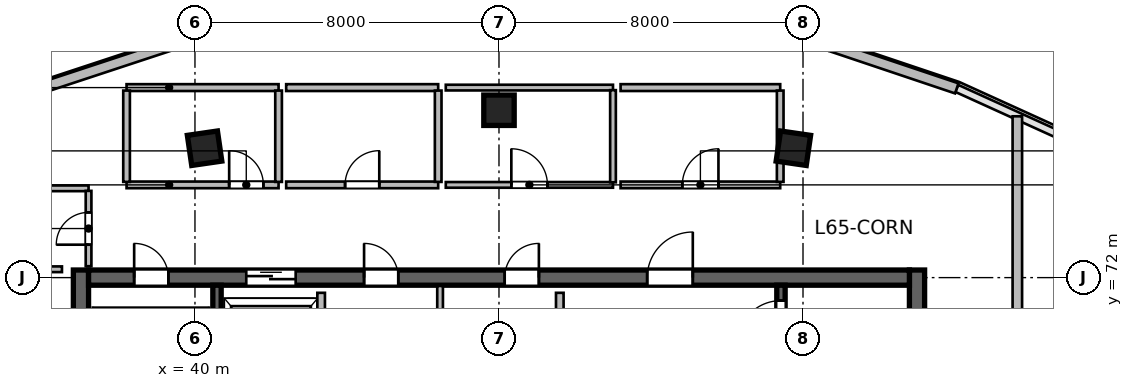
"""IFC4 building model, lengths in metres.
Left out: names, types, materials, properties, quantities, classifications, styles, units other than length and angle.
Written with IfcOpenShell. Run it as: python <this file> out.ifc"""

import sys

from ifc_helpers import new_model, si_unit, direction, frame, frame_2d, origin, origin_2d, place, context, subcontext, project, spatial, rectangle, extrude, source, transform, mapped, element, fill, save


model = new_model("IFC4")
c1 = context("Model", 3, precision=1e-05, world=origin(), true_north=direction((0.0, 1.0)))
c2 = subcontext(c1, "Body", "Model", "MODEL_VIEW")
j1 = project(units=[si_unit("LENGTHUNIT", "METRE"), si_unit("PLANEANGLEUNIT", "RADIAN")], contexts=[c1])
p1 = place(None, origin())
s1 = spatial("IfcSite", under=j1, at=p1, CompositionType="ELEMENT")
p2 = place(p1, origin())
s2 = spatial("IfcBuilding", under=s1, at=p2, CompositionType="ELEMENT")
p3 = place(p2, frame((0.0, 0.0, 267.9)))
s3 = spatial("IfcBuildingStorey", under=s2, at=p3, CompositionType="ELEMENT", Elevation=267.9)
m1 = source(origin(), c2, "Body", "SweptSolid", [
    extrude(rectangle(XDim=12.0, YDim=0.4, at=frame_2d((6.0, 0.0))), origin(), (0.0, 0.0, 1.0), 3.9),
])
for number, where, z_axis, x_axis in (
    (1, (37.0, 60.2, 0.0), (0.0, 0.0, 1.0), (0.0, 1.0, 0.0)),
    (2, (59.0, 60.2, 0.0), (0.0, 0.0, 1.0), (0.0, 1.0, 0.0)),
):
    element("IfcWall", number, at=place(p3, frame(where, z_axis=z_axis, x_axis=x_axis)), inside=s3, PredefinedType="SHEAR", context=c2, shape_type="MappedRepresentation", body=[
        mapped(m1, transform((0.0, 0.0, 0.0), scale=1.0)),
    ])
m2 = source(origin(), c2, "Body", "SweptSolid", [
    extrude(rectangle(XDim=21.6, YDim=0.4, at=frame_2d((10.8, 0.0))), origin(), (0.0, 0.0, 1.0), 3.9),
])
p4 = place(p3, frame((37.2, 72.0, 0.0), z_axis=(0.0, 0.0, 1.0), x_axis=(1.0, 0.0, 0.0)))
e3 = element("IfcWall", 3, at=p4, inside=s3, PredefinedType="SHEAR", context=c2, shape_type="MappedRepresentation", body=[
    mapped(m2, transform((0.0, 0.0, 0.0), scale=1.0)),
])
p5 = place(p4, frame((1.2, 0.0, 0.0)))
e4 = element("IfcOpeningElement", 4, at=p5, cuts=e3, PredefinedType="OPENING", context=c2, shape_type="SweptSolid", body=[
    extrude(rectangle(XDim=0.9, YDim=2.1, at=frame_2d((0.45, 1.05))), frame((0.0, 0.21, 0.0), z_axis=(0.0, -1.0, 0.0), x_axis=(1.0, 0.0, 0.0)), (0.0, 0.0, 1.0), 0.42),
])
p6 = place(p4, frame((14.7, 0.0, 0.0)))
e5 = element("IfcOpeningElement", 5, at=p6, cuts=e3, PredefinedType="OPENING", context=c2, shape_type="SweptSolid", body=[
    extrude(rectangle(XDim=1.2, YDim=2.15, at=frame_2d((0.6, 1.075))), frame((0.0, 0.21, 0.0), z_axis=(0.0, -1.0, 0.0), x_axis=(1.0, 0.0, 0.0)), (0.0, 0.0, 1.0), 0.42),
])
p7 = place(p4, frame((4.15, 0.0, 0.0)))
e6 = element("IfcOpeningElement", 6, at=p7, cuts=e3, PredefinedType="OPENING", context=c2, shape_type="SweptSolid", body=[
    extrude(rectangle(XDim=1.3, YDim=2.15, at=frame_2d((0.65, 1.075))), frame((0.0, 0.21, 0.0), z_axis=(0.0, -1.0, 0.0), x_axis=(1.0, 0.0, 0.0)), (0.0, 0.0, 1.0), 0.42),
])
p8 = place(p4, frame((7.25, 0.0, 0.0)))
e7 = element("IfcOpeningElement", 7, at=p8, cuts=e3, PredefinedType="OPENING", context=c2, shape_type="SweptSolid", body=[
    extrude(rectangle(XDim=0.9, YDim=2.1, at=frame_2d((0.45, 1.05))), frame((0.0, 0.21, 0.0), z_axis=(0.0, -1.0, 0.0), x_axis=(1.0, 0.0, 0.0)), (0.0, 0.0, 1.0), 0.42),
])
p9 = place(p4, frame((10.95, 0.0, 0.0)))
e8 = element("IfcOpeningElement", 8, at=p9, cuts=e3, PredefinedType="OPENING", context=c2, shape_type="SweptSolid", body=[
    extrude(rectangle(XDim=0.9, YDim=2.1, at=frame_2d((0.45, 1.05))), frame((0.0, 0.21, 0.0), z_axis=(0.0, -1.0, 0.0), x_axis=(1.0, 0.0, 0.0)), (0.0, 0.0, 1.0), 0.42),
])
m3 = source(origin(), c2, "Body", "SweptSolid", [
    extrude(rectangle(XDim=11.2, YDim=0.22, at=frame_2d((5.6, 0.0))), origin(), (0.0, 0.0, 1.0), 3.9),
])
p10 = place(p3, frame((40.58, 60.6, 0.0), z_axis=(0.0, 0.0, 1.0), x_axis=(0.0, 1.0, 0.0)))
e9 = element("IfcWall", 9, at=p10, inside=s3, PredefinedType="SHEAR", context=c2, shape_type="MappedRepresentation", body=[
    mapped(m3, transform((0.0, 0.0, 0.0), scale=1.0)),
])
p11 = place(p3, frame((55.42, 60.6, 0.0), z_axis=(0.0, 0.0, 1.0), x_axis=(0.0, 1.0, 0.0)))
e10 = element("IfcWall", 10, at=p11, inside=s3, PredefinedType="SHEAR", context=c2, shape_type="MappedRepresentation", body=[
    mapped(m3, transform((0.0, 0.0, 0.0), scale=1.0)),
])
p12 = place(p11, frame((9.645, 0.0, 0.0)))
e11 = element("IfcOpeningElement", 11, at=p12, cuts=e10, PredefinedType="OPENING", context=c2, shape_type="SweptSolid", body=[
    extrude(rectangle(XDim=1.15, YDim=2.15, at=frame_2d((0.575, 1.075))), frame((0.0, 0.12, 0.0), z_axis=(0.0, -1.0, 0.0), x_axis=(1.0, 0.0, 0.0)), (0.0, 0.0, 1.0), 0.24),
])
m4 = source(origin(), c2, "Body", "SweptSolid", [
    extrude(rectangle(XDim=0.8, YDim=0.8, at=origin_2d()), origin(), (0.0, 0.0, 1.0), 3.9),
])
for number, where, z_axis, x_axis in (
    (12, (40.253, 75.404, 0.0), (0.0, 0.0, 1.0), (-0.143, 0.99, 0.0)),
    (13, (48.0, 76.404, 0.0), (0.0, 0.0, 1.0), (0.0, 1.0, 0.0)),
    (14, (55.747, 75.404, 0.0), (0.0, 0.0, 1.0), (0.143, 0.99, 0.0)),
):
    element("IfcColumn", number, at=place(p3, frame(where, z_axis=z_axis, x_axis=x_axis)), inside=s3, PredefinedType="COLUMN", context=c2, shape_type="MappedRepresentation", body=[
        mapped(m4, transform((0.0, 0.0, 0.0), scale=1.0)),
    ])
m5 = source(origin(), c2, "Body", "SweptSolid", [
    extrude(rectangle(XDim=3.54, YDim=0.28, at=frame_2d((1.77, 0.0))), origin(), (0.0, 0.0, 1.0), 3.65),
])
p13 = place(p3, frame((36.132, 77.049, 0.0), z_axis=(0.0, 0.0, 1.0), x_axis=(0.949678507031, 0.313226329165, 0.0)))
e15 = element("IfcWall", 15, at=p13, inside=s3, PredefinedType="SOLIDWALL", context=c2, shape_type="MappedRepresentation", body=[
    mapped(m5, transform((0.0, 0.0, 0.0), scale=1.0)),
])
m6 = source(origin(), c2, "Body", "SweptSolid", [
    extrude(rectangle(XDim=3.543, YDim=0.28, at=frame_2d((1.771, 0.0))), origin(), (0.0, 0.0, 1.0), 3.65),
])
p14 = place(p3, frame((56.688, 78.108, 0.0), z_axis=(0.0, 0.0, 1.0), x_axis=(0.947922565312, -0.318500879389, 0.0)))
e16 = element("IfcWall", 16, at=p14, inside=s3, PredefinedType="SOLIDWALL", context=c2, shape_type="MappedRepresentation", body=[
    mapped(m6, transform((0.0, 0.0, 0.0), scale=1.0)),
])
m7 = source(origin(), c2, "Body", "SweptSolid", [
    extrude(rectangle(XDim=5.8, YDim=0.2, at=frame_2d((2.9, 0.0))), origin(), (0.0, 0.0, 1.0), 3.65),
])
p15 = place(p3, frame((49.6, 65.8, 0.0), z_axis=(0.0, 0.0, 1.0), x_axis=(0.0, 1.0, 0.0)))
e17 = element("IfcWall", 17, at=p15, inside=s3, PredefinedType="SOLIDWALL", context=c2, shape_type="MappedRepresentation", body=[
    mapped(m7, transform((0.0, 0.0, 0.0), scale=1.0)),
])
m8 = source(origin(), c2, "Body", "SweptSolid", [
    extrude(rectangle(XDim=3.2, YDim=0.2, at=frame_2d((1.6, 0.0))), origin(), (0.0, 0.0, 1.0), 3.65),
])
p16 = place(p3, frame((43.32, 68.4, 0.0), z_axis=(0.0, 0.0, 1.0), x_axis=(0.0, 1.0, 0.0)))
e18 = element("IfcWall", 18, at=p16, inside=s3, PredefinedType="SOLIDWALL", context=c2, shape_type="MappedRepresentation", body=[
    mapped(m8, transform((0.0, 0.0, 0.0), scale=1.0)),
])
m9 = source(origin(), c2, "Body", "SweptSolid", [
    extrude(rectangle(XDim=3.38, YDim=0.15, at=frame_2d((1.69, 0.0))), origin(), (0.0, 0.0, 1.0), 3.65),
])
p17 = place(p3, frame((46.45, 68.4, 0.0), z_axis=(0.0, 0.0, 1.0), x_axis=(0.0, 1.0, 0.0)))
e19 = element("IfcWall", 19, at=p17, inside=s3, PredefinedType="PARTITIONING", context=c2, shape_type="MappedRepresentation", body=[
    mapped(m9, transform((0.0, 0.0, 0.0), scale=1.0)),
])
m10 = source(origin(), c2, "Body", "SweptSolid", [
    extrude(rectangle(XDim=2.1, YDim=0.15, at=frame_2d((1.05, 0.0))), origin(), (0.0, 0.0, 1.0), 3.65),
])
p18 = place(p3, frame((34.4, 72.22, 0.0), z_axis=(0.0, 0.0, 1.0), x_axis=(1.0, 0.0, 0.0)))
e20 = element("IfcWall", 20, at=p18, inside=s3, PredefinedType="PARTITIONING", context=c2, shape_type="MappedRepresentation", body=[
    mapped(m10, transform((0.0, 0.0, 0.0), scale=1.0)),
])
m11 = source(origin(), c2, "Body", "SweptSolid", [
    extrude(rectangle(XDim=2.8, YDim=0.15, at=frame_2d((1.4, 0.0))), origin(), (0.0, 0.0, 1.0), 3.65),
])
p19 = place(p3, frame((34.4, 74.35, 0.0), z_axis=(0.0, 0.0, 1.0), x_axis=(1.0, 0.0, 0.0)))
e21 = element("IfcWall", 21, at=p19, inside=s3, PredefinedType="PARTITIONING", context=c2, shape_type="MappedRepresentation", body=[
    mapped(m11, transform((0.0, 0.0, 0.0), scale=1.0)),
])
m12 = source(origin(), c2, "Body", "SweptSolid", [
    extrude(rectangle(XDim=1.982, YDim=0.15, at=frame_2d((0.991, 0.0))), origin(), (0.0, 0.0, 1.0), 3.65),
])
p20 = place(p3, frame((37.2, 72.3, 0.0), z_axis=(0.0, 0.0, 1.0), x_axis=(0.0, 1.0, 0.0)))
e22 = element("IfcWall", 22, at=p20, inside=s3, PredefinedType="PARTITIONING", context=c2, shape_type="MappedRepresentation", body=[
    mapped(m12, transform((0.0, 0.0, 0.0), scale=1.0)),
])
p21 = place(p20, frame((0.566, 0.0, 0.0)))
e23 = element("IfcOpeningElement", 23, at=p21, cuts=e22, PredefinedType="OPENING", context=c2, shape_type="SweptSolid", body=[
    extrude(rectangle(XDim=0.85, YDim=2.1, at=frame_2d((0.425, 1.05))), frame((0.0, 0.085, 0.0), z_axis=(0.0, -1.0, 0.0), x_axis=(1.0, 0.0, 0.0)), (0.0, 0.0, 1.0), 0.17),
])
m13 = source(origin(), c2, "Body", "SweptSolid", [
    extrude(rectangle(XDim=4.0, YDim=0.175, at=frame_2d((2.0, 0.0))), origin(), (0.0, 0.0, 1.0), 3.65),
])
p22 = place(p3, frame((38.2, 74.44, 0.0), z_axis=(0.0, 0.0, 1.0), x_axis=(1.0, 0.0, 0.0)))
e24 = element("IfcWall", 24, at=p22, inside=s3, PredefinedType="PARTITIONING", context=c2, shape_type="MappedRepresentation", body=[
    mapped(m13, transform((0.0, 0.0, 0.0), scale=1.0)),
])
p23 = place(p22, frame((2.7, 0.0, 0.0)))
e25 = element("IfcOpeningElement", 25, at=p23, cuts=e24, PredefinedType="OPENING", context=c2, shape_type="SweptSolid", body=[
    extrude(rectangle(XDim=0.9, YDim=2.08, at=frame_2d((0.45, 1.04))), frame((0.0, 0.098, 0.0), z_axis=(0.0, -1.0, 0.0), x_axis=(1.0, 0.0, 0.0)), (0.0, 0.0, 1.0), 0.195),
])
m14 = source(origin(), c2, "Body", "SweptSolid", [
    extrude(rectangle(XDim=4.0, YDim=0.18, at=frame_2d((2.0, 0.0))), origin(), (0.0, 0.0, 1.0), 3.65),
])
p24 = place(p3, frame((38.2, 77.0, 0.0), z_axis=(0.0, 0.0, 1.0), x_axis=(1.0, 0.0, 0.0)))
e26 = element("IfcWall", 26, at=p24, inside=s3, PredefinedType="PLUMBINGWALL", context=c2, shape_type="MappedRepresentation", body=[
    mapped(m14, transform((0.0, 0.0, 0.0), scale=1.0)),
])
m15 = source(origin(), c2, "Body", "SweptSolid", [
    extrude(rectangle(XDim=2.403, YDim=0.175, at=frame_2d((1.201, 0.0))), origin(), (0.0, 0.0, 1.0), 3.65),
])
for number, where, z_axis, x_axis in (
    (27, (38.2, 74.519, 0.0), (0.0, 0.0, 1.0), (0.0, 1.0, 0.0)),
    (28, (42.2, 74.519, 0.0), (0.0, 0.0, 1.0), (0.0, 1.0, 0.0)),
):
    element("IfcWall", number, at=place(p3, frame(where, z_axis=z_axis, x_axis=x_axis)), inside=s3, PredefinedType="PARTITIONING", context=c2, shape_type="MappedRepresentation", body=[
        mapped(m15, transform((0.0, 0.0, 0.0), scale=1.0)),
    ])
p25 = place(p3, frame((42.4, 74.44, 0.0), z_axis=(0.0, 0.0, 1.0), x_axis=(1.0, 0.0, 0.0)))
e29 = element("IfcWall", 29, at=p25, inside=s3, PredefinedType="PARTITIONING", context=c2, shape_type="MappedRepresentation", body=[
    mapped(m13, transform((0.0, 0.0, 0.0), scale=1.0)),
])
p26 = place(p25, frame((1.55, 0.0, 0.0)))
e30 = element("IfcOpeningElement", 30, at=p26, cuts=e29, PredefinedType="OPENING", context=c2, shape_type="SweptSolid", body=[
    extrude(rectangle(XDim=0.9, YDim=2.08, at=frame_2d((0.45, 1.04))), frame((0.0, 0.098, 0.0), z_axis=(0.0, -1.0, 0.0), x_axis=(1.0, 0.0, 0.0)), (0.0, 0.0, 1.0), 0.195),
])
p27 = place(p3, frame((42.4, 77.0, 0.0), z_axis=(0.0, 0.0, 1.0), x_axis=(1.0, 0.0, 0.0)))
e31 = element("IfcWall", 31, at=p27, inside=s3, PredefinedType="PLUMBINGWALL", context=c2, shape_type="MappedRepresentation", body=[
    mapped(m14, transform((0.0, 0.0, 0.0), scale=1.0)),
])
p28 = place(p3, frame((46.4, 74.519, 0.0), z_axis=(0.0, 0.0, 1.0), x_axis=(0.0, 1.0, 0.0)))
e32 = element("IfcWall", 32, at=p28, inside=s3, PredefinedType="PARTITIONING", context=c2, shape_type="MappedRepresentation", body=[
    mapped(m15, transform((0.0, 0.0, 0.0), scale=1.0)),
])
m16 = source(origin(), c2, "Body", "SweptSolid", [
    extrude(rectangle(XDim=4.4, YDim=0.15, at=frame_2d((2.2, 0.0))), origin(), (0.0, 0.0, 1.0), 3.65),
])
p29 = place(p3, frame((46.6, 74.44, 0.0), z_axis=(0.0, 0.0, 1.0), x_axis=(1.0, 0.0, 0.0)))
e33 = element("IfcWall", 33, at=p29, inside=s3, PredefinedType="PARTITIONING", context=c2, shape_type="MappedRepresentation", body=[
    mapped(m16, transform((0.0, 0.0, 0.0), scale=1.0)),
])
p30 = place(p29, frame((1.725, 0.0, 0.0)))
e34 = element("IfcOpeningElement", 34, at=p30, cuts=e33, PredefinedType="OPENING", context=c2, shape_type="SweptSolid", body=[
    extrude(rectangle(XDim=0.95, YDim=2.1, at=frame_2d((0.475, 1.05))), frame((0.0, 0.085, 0.0), z_axis=(0.0, -1.0, 0.0), x_axis=(1.0, 0.0, 0.0)), (0.0, 0.0, 1.0), 0.17),
])
p31 = place(p3, frame((46.6, 77.0, 0.0), z_axis=(0.0, 0.0, 1.0), x_axis=(1.0, 0.0, 0.0)))
e35 = element("IfcWall", 35, at=p31, inside=s3, PredefinedType="PARTITIONING", context=c2, shape_type="MappedRepresentation", body=[
    mapped(m16, transform((0.0, 0.0, 0.0), scale=1.0)),
])
m17 = source(origin(), c2, "Body", "SweptSolid", [
    extrude(rectangle(XDim=2.425, YDim=0.15, at=frame_2d((1.212, 0.0))), origin(), (0.0, 0.0, 1.0), 3.65),
])
p32 = place(p3, frame((51.0, 74.508, 0.0), z_axis=(0.0, 0.0, 1.0), x_axis=(0.0, 1.0, 0.0)))
e36 = element("IfcWall", 36, at=p32, inside=s3, PredefinedType="PARTITIONING", context=c2, shape_type="MappedRepresentation", body=[
    mapped(m17, transform((0.0, 0.0, 0.0), scale=1.0)),
])
m18 = source(origin(), c2, "Body", "SweptSolid", [
    extrude(rectangle(XDim=4.2, YDim=0.175, at=frame_2d((2.1, 0.0))), origin(), (0.0, 0.0, 1.0), 3.65),
])
p33 = place(p3, frame((51.2, 74.44, 0.0), z_axis=(0.0, 0.0, 1.0), x_axis=(1.0, 0.0, 0.0)))
e37 = element("IfcWall", 37, at=p33, inside=s3, PredefinedType="PARTITIONING", context=c2, shape_type="MappedRepresentation", body=[
    mapped(m18, transform((0.0, 0.0, 0.0), scale=1.0)),
])
p34 = place(p33, frame((1.625, 0.0, 0.0)))
e38 = element("IfcOpeningElement", 38, at=p34, cuts=e37, PredefinedType="OPENING", context=c2, shape_type="SweptSolid", body=[
    extrude(rectangle(XDim=0.95, YDim=2.12, at=frame_2d((0.475, 1.06))), frame((0.0, 0.098, 0.0), z_axis=(0.0, -1.0, 0.0), x_axis=(1.0, 0.0, 0.0)), (0.0, 0.0, 1.0), 0.195),
])
m19 = source(origin(), c2, "Body", "SweptSolid", [
    extrude(rectangle(XDim=4.2, YDim=0.18, at=frame_2d((2.1, 0.0))), origin(), (0.0, 0.0, 1.0), 3.65),
])
p35 = place(p3, frame((51.2, 77.0, 0.0), z_axis=(0.0, 0.0, 1.0), x_axis=(1.0, 0.0, 0.0)))
e39 = element("IfcWall", 39, at=p35, inside=s3, PredefinedType="PLUMBINGWALL", context=c2, shape_type="MappedRepresentation", body=[
    mapped(m19, transform((0.0, 0.0, 0.0), scale=1.0)),
])
p36 = place(p3, frame((55.4, 74.519, 0.0), z_axis=(0.0, 0.0, 1.0), x_axis=(0.0, 1.0, 0.0)))
e40 = element("IfcWall", 40, at=p36, inside=s3, PredefinedType="PARTITIONING", context=c2, shape_type="MappedRepresentation", body=[
    mapped(m15, transform((0.0, 0.0, 0.0), scale=1.0)),
])
m20 = source(origin(), c2, "Body", "SweptSolid", [
    extrude(rectangle(XDim=11.445, YDim=0.25, at=frame_2d((5.722, 0.0))), origin(), (0.0, 0.0, 1.0), 3.65),
])
p37 = place(p3, frame((61.64, 64.8, 0.0), z_axis=(0.0, 0.0, 1.0), x_axis=(0.0, 1.0, 0.0)))
e41 = element("IfcWall", 41, at=p37, inside=s3, PredefinedType="PARTITIONING", context=c2, shape_type="MappedRepresentation", body=[
    mapped(m20, transform((0.0, 0.0, 0.0), scale=1.0)),
])
p38 = place(p37, frame((5.247, 0.0, 0.0)))
e42 = element("IfcOpeningElement", 42, at=p38, cuts=e41, PredefinedType="OPENING", context=c2, shape_type="SweptSolid", body=[
    extrude(rectangle(XDim=0.95, YDim=2.1, at=frame_2d((0.475, 1.05))), frame((0.0, 0.135, 0.0), z_axis=(0.0, -1.0, 0.0), x_axis=(1.0, 0.0, 0.0)), (0.0, 0.0, 1.0), 0.27),
])
m21 = source(origin(), c2, "Body", "SweptSolid", [
    extrude(rectangle(XDim=0.9, YDim=2.1, at=frame_2d((0.45, 1.05))), frame((0.0, 0.025, 0.0), z_axis=(0.0, -1.0, 0.0), x_axis=(1.0, 0.0, 0.0)), (0.0, 0.0, 1.0), 0.05),
])
p39 = place(p5, origin())
e43 = element("IfcDoor", 43, at=p39, inside=s3, OperationType="SINGLE_SWING_LEFT", PredefinedType="DOOR", context=c2, shape_type="MappedRepresentation", body=[
    mapped(m21, transform((0.0, 0.0, 0.0), scale=1.0)),
])
fill(e4, e43)
m22 = source(origin(), c2, "Body", "SweptSolid", [
    extrude(rectangle(XDim=1.15, YDim=2.15, at=frame_2d((0.575, 1.075))), frame((0.0, 0.025, 0.0), z_axis=(0.0, -1.0, 0.0), x_axis=(1.0, 0.0, 0.0)), (0.0, 0.0, 1.0), 0.05),
])
p40 = place(p12, origin())
e44 = element("IfcDoor", 44, at=p40, inside=s3, OperationType="SINGLE_SWING_LEFT", PredefinedType="DOOR", context=c2, shape_type="MappedRepresentation", body=[
    mapped(m22, transform((0.0, 0.0, 0.0), scale=1.0)),
])
fill(e11, e44)
m23 = source(origin(), c2, "Body", "SweptSolid", [
    extrude(rectangle(XDim=1.2, YDim=2.15, at=frame_2d((0.6, 1.075))), frame((0.0, 0.025, 0.0), z_axis=(0.0, -1.0, 0.0), x_axis=(1.0, 0.0, 0.0)), (0.0, 0.0, 1.0), 0.05),
])
p41 = place(p6, origin())
e45 = element("IfcDoor", 45, at=p41, inside=s3, OperationType="SINGLE_SWING_RIGHT", PredefinedType="DOOR", context=c2, shape_type="MappedRepresentation", body=[
    mapped(m23, transform((0.0, 0.0, 0.0), scale=1.0)),
])
fill(e5, e45)
m24 = source(origin(), c2, "Body", "SweptSolid", [
    extrude(rectangle(XDim=1.3, YDim=2.15, at=frame_2d((0.65, 1.075))), frame((0.0, 0.025, 0.0), z_axis=(0.0, -1.0, 0.0), x_axis=(1.0, 0.0, 0.0)), (0.0, 0.0, 1.0), 0.05),
])
p42 = place(p7, origin())
e46 = element("IfcDoor", 46, at=p42, inside=s3, OperationType="DOUBLE_DOOR_SLIDING", PredefinedType="DOOR", context=c2, shape_type="MappedRepresentation", body=[
    mapped(m24, transform((0.0, 0.0, 0.0), scale=1.0)),
])
fill(e6, e46)
p43 = place(p8, origin())
e47 = element("IfcDoor", 47, at=p43, inside=s3, OperationType="SINGLE_SWING_LEFT", PredefinedType="DOOR", context=c2, shape_type="MappedRepresentation", body=[
    mapped(m21, transform((0.0, 0.0, 0.0), scale=1.0)),
])
fill(e7, e47)
p44 = place(p9, origin())
e48 = element("IfcDoor", 48, at=p44, inside=s3, OperationType="SINGLE_SWING_RIGHT", PredefinedType="DOOR", context=c2, shape_type="MappedRepresentation", body=[
    mapped(m21, transform((0.0, 0.0, 0.0), scale=1.0)),
])
fill(e8, e48)
m25 = source(origin(), c2, "Body", "SweptSolid", [
    extrude(rectangle(XDim=0.85, YDim=2.1, at=frame_2d((0.425, 1.05))), frame((0.0, 0.025, 0.0), z_axis=(0.0, -1.0, 0.0), x_axis=(1.0, 0.0, 0.0)), (0.0, 0.0, 1.0), 0.05),
])
p45 = place(p21, origin())
e49 = element("IfcDoor", 49, at=p45, inside=s3, OperationType="SINGLE_SWING_LEFT", PredefinedType="DOOR", context=c2, shape_type="MappedRepresentation", body=[
    mapped(m25, transform((0.0, 0.0, 0.0), scale=1.0)),
])
fill(e23, e49)
m26 = source(origin(), c2, "Body", "SweptSolid", [
    extrude(rectangle(XDim=0.9, YDim=2.08, at=frame_2d((0.45, 1.04))), frame((0.0, 0.025, 0.0), z_axis=(0.0, -1.0, 0.0), x_axis=(1.0, 0.0, 0.0)), (0.0, 0.0, 1.0), 0.05),
])
p46 = place(p23, origin())
e50 = element("IfcDoor", 50, at=p46, inside=s3, OperationType="SINGLE_SWING_LEFT", PredefinedType="DOOR", context=c2, shape_type="MappedRepresentation", body=[
    mapped(m26, transform((0.0, 0.0, 0.0), scale=1.0)),
])
fill(e25, e50)
p47 = place(p26, origin())
e51 = element("IfcDoor", 51, at=p47, inside=s3, OperationType="SINGLE_SWING_RIGHT", PredefinedType="DOOR", context=c2, shape_type="MappedRepresentation", body=[
    mapped(m26, transform((0.0, 0.0, 0.0), scale=1.0)),
])
fill(e30, e51)
m27 = source(origin(), c2, "Body", "SweptSolid", [
    extrude(rectangle(XDim=0.95, YDim=2.1, at=frame_2d((0.475, 1.05))), frame((0.0, 0.025, 0.0), z_axis=(0.0, -1.0, 0.0), x_axis=(1.0, 0.0, 0.0)), (0.0, 0.0, 1.0), 0.05),
])
p48 = place(p30, origin())
e52 = element("IfcDoor", 52, at=p48, inside=s3, OperationType="SINGLE_SWING_LEFT", PredefinedType="DOOR", context=c2, shape_type="MappedRepresentation", body=[
    mapped(m27, transform((0.0, 0.0, 0.0), scale=1.0)),
])
fill(e34, e52)
m28 = source(origin(), c2, "Body", "SweptSolid", [
    extrude(rectangle(XDim=0.95, YDim=2.12, at=frame_2d((0.475, 1.06))), frame((0.0, 0.025, 0.0), z_axis=(0.0, -1.0, 0.0), x_axis=(1.0, 0.0, 0.0)), (0.0, 0.0, 1.0), 0.05),
])
p49 = place(p34, origin())
e53 = element("IfcDoor", 53, at=p49, inside=s3, OperationType="SINGLE_SWING_RIGHT", PredefinedType="DOOR", context=c2, shape_type="MappedRepresentation", body=[
    mapped(m28, transform((0.0, 0.0, 0.0), scale=1.0)),
])
fill(e38, e53)
save(model, sys.argv[1])
